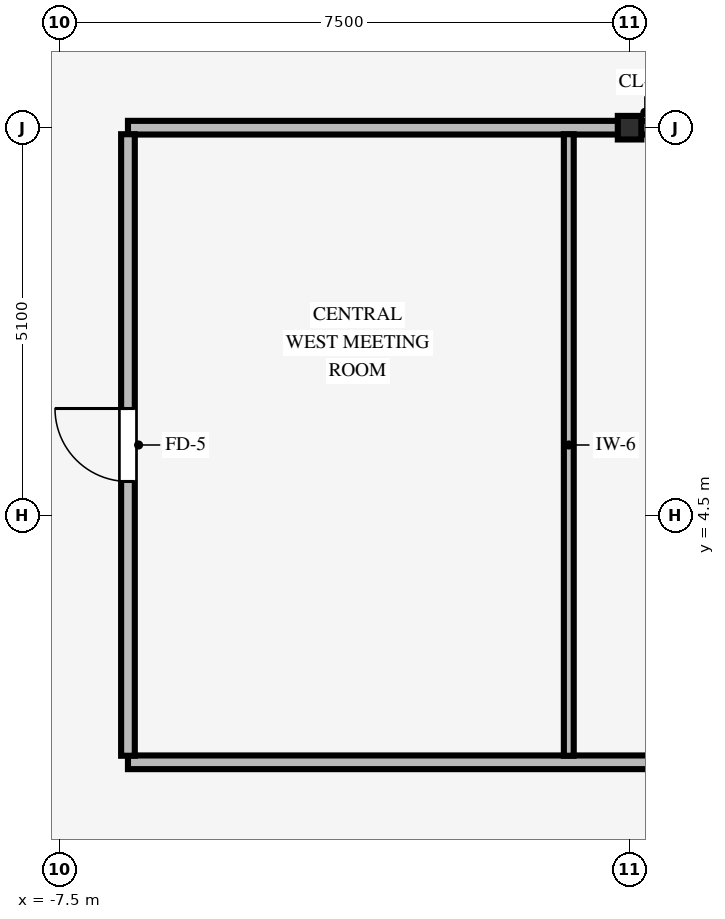
"""IFC4 building model, lengths in metres.
Left out: names, types, materials, properties, quantities, classifications, styles, units other than length and angle.
Written with IfcOpenShell. Run it as: python <this file> out.ifc"""

import sys

from ifc_helpers import new_model, si_unit, direction, frame, frame_2d, origin, origin_2d, place, context, subcontext, project, spatial, rectangle, i_section, extrude, source, transform, mapped, element, fill, save


model = new_model("IFC4")
c1 = context("Model", 3, precision=1e-05, world=origin(), true_north=direction((0.0, 1.0)))
c2 = subcontext(c1, "Body", "Model", "MODEL_VIEW")
j1 = project(units=[si_unit("LENGTHUNIT", "METRE"), si_unit("PLANEANGLEUNIT", "RADIAN")], contexts=[c1])
p1 = place(None, origin())
s1 = spatial("IfcSite", under=j1, at=p1, CompositionType="ELEMENT")
p2 = place(p1, origin())
s2 = spatial("IfcBuilding", under=s1, at=p2, CompositionType="ELEMENT")
p3 = place(p2, frame((0.0, 0.0, 234.7)))
s3 = spatial("IfcBuildingStorey", under=s2, at=p3, CompositionType="ELEMENT", Elevation=234.7)
p4 = place(p3, frame((0.0, 9.6, 0.0), z_axis=(0.0, 0.0, 1.0), x_axis=(1.0, 0.0, 0.0)))
e1 = element("IfcColumn", 1, at=p4, inside=s3, PredefinedType="COLUMN", context=c2, shape_type="SweptSolid", body=[
    extrude(i_section(OverallWidth=0.31, OverallDepth=0.31, WebThickness=0.015, FlangeThickness=0.015, FilletRadius=0.015, at=origin_2d()), origin(), (0.0, 0.0, 1.0), 3.37),
])
p5 = place(p3, frame((-6.6, 1.25, 0.0), z_axis=(0.0, 0.0, 1.0), x_axis=(1.0, 0.0, 0.0)))
e2 = element("IfcWall", 2, at=p5, inside=s3, PredefinedType="PARTITIONING", context=c2, shape_type="SweptSolid", body=[
    extrude(rectangle(XDim=13.2, YDim=0.18, at=frame_2d((6.6, 0.0))), origin(), (0.0, 0.0, 1.0), 3.36),
])
for number, where, z_axis, x_axis in (
    (3, (-6.6, 9.6, 0.0), (0.0, 0.0, 1.0), (1.0, 0.0, 0.0)),
    (4, (0.151, 9.6, 0.0), (0.0, 0.0, 1.0), (1.0, 0.0, 0.0)),
):
    element("IfcWall", number, at=place(p3, frame(where, z_axis=z_axis, x_axis=x_axis)), inside=s3, PredefinedType="PARTITIONING", context=c2, shape_type="SweptSolid", body=[
        extrude(rectangle(XDim=6.449, YDim=0.18, at=frame_2d((3.225, 0.0))), origin(), (0.0, 0.0, 1.0), 2.405),
    ])
p6 = place(p3, frame((-6.6, 1.336, 0.0), z_axis=(0.0, 0.0, 1.0), x_axis=(0.0, 1.0, 0.0)))
e5 = element("IfcWall", 5, at=p6, inside=s3, PredefinedType="PARTITIONING", context=c2, shape_type="SweptSolid", body=[
    extrude(rectangle(XDim=8.178, YDim=0.18, at=frame_2d((4.089, 0.0))), origin(), (0.0, 0.0, 1.0), 3.36),
])
p7 = place(p6, frame((3.609, 0.0, 0.0)))
e6 = element("IfcOpeningElement", 6, at=p7, cuts=e5, PredefinedType="OPENING", context=c2, shape_type="SweptSolid", body=[
    extrude(rectangle(XDim=0.96, YDim=2.1, at=frame_2d((0.48, 1.05))), frame((0.0, 0.1, 0.0), z_axis=(0.0, -1.0, 0.0), x_axis=(1.0, 0.0, 0.0)), (0.0, 0.0, 1.0), 0.2),
])
p8 = place(p3, frame((-0.8, 1.336, 0.0), z_axis=(0.0, 0.0, 1.0), x_axis=(0.0, 1.0, 0.0)))
e7 = element("IfcWall", 7, at=p8, inside=s3, PredefinedType="PARTITIONING", context=c2, shape_type="SweptSolid", body=[
    extrude(rectangle(XDim=8.178, YDim=0.13, at=frame_2d((4.089, 0.0))), origin(), (0.0, 0.0, 1.0), 3.36),
])
m1 = source(origin(), c2, "Body", "SweptSolid", [
    extrude(rectangle(XDim=0.96, YDim=2.1, at=frame_2d((0.48, 1.05))), frame((0.0, 0.025, 0.0), z_axis=(0.0, -1.0, 0.0), x_axis=(1.0, 0.0, 0.0)), (0.0, 0.0, 1.0), 0.05),
])
p9 = place(p7, origin())
e8 = element("IfcDoor", 8, at=p9, inside=s3, OperationType="SINGLE_SWING_RIGHT", PredefinedType="DOOR", context=c2, shape_type="MappedRepresentation", body=[
    mapped(m1, transform((0.0, 0.0, 0.0), scale=1.0)),
])
fill(e6, e8)
save(model, sys.argv[1])
